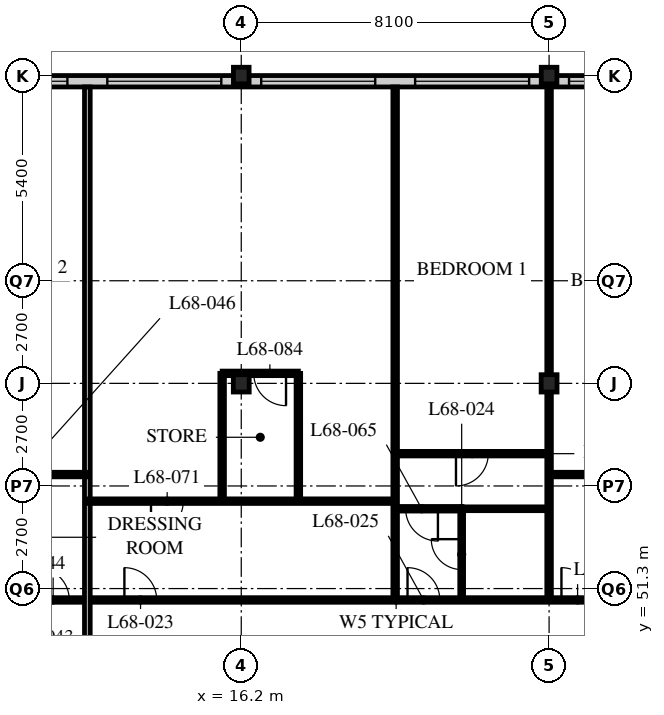
"""IFC4 building model, lengths in metres.
Left out: names, types, materials, properties, quantities, classifications, styles, units other than length and angle.
Written with IfcOpenShell. Run it as: python <this file> out.ifc"""

import sys

from ifc_helpers import new_model, si_unit, direction, frame, frame_2d, origin, origin_2d, place, context, subcontext, project, spatial, rectangle, i_section, extrude, element, fill, save


model = new_model("IFC4")
c1 = context("Model", 3, precision=1e-05, world=origin(), true_north=direction((0.0, 1.0)))
c2 = subcontext(c1, "Body", "Model", "MODEL_VIEW")
j1 = project(units=[si_unit("LENGTHUNIT", "METRE"), si_unit("PLANEANGLEUNIT", "RADIAN")], contexts=[c1])
p1 = place(None, origin())
s1 = spatial("IfcSite", under=j1, at=p1, CompositionType="ELEMENT")
p2 = place(p1, origin())
s2 = spatial("IfcBuilding", under=s1, at=p2, CompositionType="ELEMENT")
p3 = place(p2, frame((0.0, 0.0, 265.8)))
s3 = spatial("IfcBuildingStorey", under=s2, at=p3, CompositionType="ELEMENT", Elevation=265.8)
p4 = place(p3, frame((16.2, 56.7, 0.0), z_axis=(0.0, 0.0, 1.0), x_axis=(1.0, 0.0, 0.0)))
e1 = element("IfcColumn", 1, at=p4, inside=s3, PredefinedType="COLUMN", context=c2, shape_type="SweptSolid", body=[
    extrude(i_section(OverallWidth=0.418, OverallDepth=0.456, WebThickness=0.042, FlangeThickness=0.067, FilletRadius=0.015, at=origin_2d()), origin(), (0.0, 0.0, 1.0), 3.9),
])
p5 = place(p3, frame((16.2, 64.8, 0.0), z_axis=(0.0, 0.0, 1.0), x_axis=(1.0, 0.0, 0.0)))
e2 = element("IfcColumn", 2, at=p5, inside=s3, PredefinedType="COLUMN", context=c2, shape_type="SweptSolid", body=[
    extrude(i_section(OverallWidth=0.412, OverallDepth=0.437, WebThickness=0.036, FlangeThickness=0.058, FilletRadius=0.015, at=origin_2d()), origin(), (0.0, 0.0, 1.0), 3.9),
])
p6 = place(p3, frame((24.3, 56.7, 0.0), z_axis=(0.0, 0.0, 1.0), x_axis=(1.0, 0.0, 0.0)))
e3 = element("IfcColumn", 3, at=p6, inside=s3, PredefinedType="COLUMN", context=c2, shape_type="SweptSolid", body=[
    extrude(i_section(OverallWidth=0.418, OverallDepth=0.456, WebThickness=0.042, FlangeThickness=0.067, FilletRadius=0.015, at=origin_2d()), origin(), (0.0, 0.0, 1.0), 3.9),
])
p7 = place(p3, frame((24.3, 64.8, 0.0), z_axis=(0.0, 0.0, 1.0), x_axis=(1.0, 0.0, 0.0)))
e4 = element("IfcColumn", 4, at=p7, inside=s3, PredefinedType="COLUMN", context=c2, shape_type="SweptSolid", body=[
    extrude(i_section(OverallWidth=0.412, OverallDepth=0.437, WebThickness=0.036, FlangeThickness=0.058, FilletRadius=0.015, at=origin_2d()), origin(), (0.0, 0.0, 1.0), 3.9),
])
p8 = place(p3, frame((48.3, 64.65, 0.0), z_axis=(0.0, 0.0, 1.0), x_axis=(-1.0, 0.0, 0.0)))
e5 = element("IfcWall", 5, at=p8, inside=s3, PredefinedType="SOLIDWALL", context=c2, shape_type="SweptSolid", body=[
    extrude(rectangle(XDim=40.2, YDim=0.3, at=frame_2d((20.1, 0.0))), origin(), (0.0, 0.0, 1.0), 3.69),
])
p9 = place(p8, frame((0.225, 0.0, 0.6)))
e6 = element("IfcOpeningElement", 6, at=p9, cuts=e5, PredefinedType="OPENING", context=c2, shape_type="SweptSolid", body=[
    extrude(rectangle(XDim=3.0, YDim=2.4, at=frame_2d((1.5, 1.2))), frame((0.0, 0.16, 0.0), z_axis=(0.0, -1.0, 0.0), x_axis=(1.0, 0.0, 0.0)), (0.0, 0.0, 1.0), 0.32),
])
p10 = place(p8, frame((4.275, 0.0, 0.6)))
e7 = element("IfcOpeningElement", 7, at=p10, cuts=e5, PredefinedType="OPENING", context=c2, shape_type="SweptSolid", body=[
    extrude(rectangle(XDim=3.0, YDim=2.4, at=frame_2d((1.5, 1.2))), frame((0.0, 0.16, 0.0), z_axis=(0.0, -1.0, 0.0), x_axis=(1.0, 0.0, 0.0)), (0.0, 0.0, 1.0), 0.32),
])
p11 = place(p8, frame((8.325, 0.0, 0.6)))
e8 = element("IfcOpeningElement", 8, at=p11, cuts=e5, PredefinedType="OPENING", context=c2, shape_type="SweptSolid", body=[
    extrude(rectangle(XDim=3.0, YDim=2.4, at=frame_2d((1.5, 1.2))), frame((0.0, 0.16, 0.0), z_axis=(0.0, -1.0, 0.0), x_axis=(1.0, 0.0, 0.0)), (0.0, 0.0, 1.0), 0.32),
])
p12 = place(p8, frame((12.375, 0.0, 0.6)))
e9 = element("IfcOpeningElement", 9, at=p12, cuts=e5, PredefinedType="OPENING", context=c2, shape_type="SweptSolid", body=[
    extrude(rectangle(XDim=3.0, YDim=2.4, at=frame_2d((1.5, 1.2))), frame((0.0, 0.16, 0.0), z_axis=(0.0, -1.0, 0.0), x_axis=(1.0, 0.0, 0.0)), (0.0, 0.0, 1.0), 0.32),
])
p13 = place(p8, frame((16.425, 0.0, 0.6)))
e10 = element("IfcOpeningElement", 10, at=p13, cuts=e5, PredefinedType="OPENING", context=c2, shape_type="SweptSolid", body=[
    extrude(rectangle(XDim=3.0, YDim=2.4, at=frame_2d((1.5, 1.2))), frame((0.0, 0.16, 0.0), z_axis=(0.0, -1.0, 0.0), x_axis=(1.0, 0.0, 0.0)), (0.0, 0.0, 1.0), 0.32),
])
p14 = place(p8, frame((20.475, 0.0, 0.6)))
e11 = element("IfcOpeningElement", 11, at=p14, cuts=e5, PredefinedType="OPENING", context=c2, shape_type="SweptSolid", body=[
    extrude(rectangle(XDim=3.0, YDim=2.4, at=frame_2d((1.5, 1.2))), frame((0.0, 0.16, 0.0), z_axis=(0.0, -1.0, 0.0), x_axis=(1.0, 0.0, 0.0)), (0.0, 0.0, 1.0), 0.32),
])
p15 = place(p8, frame((24.525, 0.0, 0.6)))
e12 = element("IfcOpeningElement", 12, at=p15, cuts=e5, PredefinedType="OPENING", context=c2, shape_type="SweptSolid", body=[
    extrude(rectangle(XDim=3.0, YDim=2.4, at=frame_2d((1.5, 1.2))), frame((0.0, 0.16, 0.0), z_axis=(0.0, -1.0, 0.0), x_axis=(1.0, 0.0, 0.0)), (0.0, 0.0, 1.0), 0.32),
])
p16 = place(p8, frame((28.575, 0.0, 0.6)))
e13 = element("IfcOpeningElement", 13, at=p16, cuts=e5, PredefinedType="OPENING", context=c2, shape_type="SweptSolid", body=[
    extrude(rectangle(XDim=3.0, YDim=2.4, at=frame_2d((1.5, 1.2))), frame((0.0, 0.16, 0.0), z_axis=(0.0, -1.0, 0.0), x_axis=(1.0, 0.0, 0.0)), (0.0, 0.0, 1.0), 0.32),
])
p17 = place(p8, frame((32.625, 0.0, 0.6)))
e14 = element("IfcOpeningElement", 14, at=p17, cuts=e5, PredefinedType="OPENING", context=c2, shape_type="SweptSolid", body=[
    extrude(rectangle(XDim=3.0, YDim=2.4, at=frame_2d((1.5, 1.2))), frame((0.0, 0.16, 0.0), z_axis=(0.0, -1.0, 0.0), x_axis=(1.0, 0.0, 0.0)), (0.0, 0.0, 1.0), 0.32),
])
p18 = place(p8, frame((36.675, 0.0, 0.6)))
e15 = element("IfcOpeningElement", 15, at=p18, cuts=e5, PredefinedType="OPENING", context=c2, shape_type="SweptSolid", body=[
    extrude(rectangle(XDim=3.0, YDim=2.4, at=frame_2d((1.5, 1.2))), frame((0.0, 0.16, 0.0), z_axis=(0.0, -1.0, 0.0), x_axis=(1.0, 0.0, 0.0)), (0.0, 0.0, 1.0), 0.32),
])
p19 = place(p3, frame((22.0, 51.0, 0.0), z_axis=(0.0, 0.0, 1.0), x_axis=(0.0, 1.0, 0.0)))
e16 = element("IfcWall", 16, at=p19, inside=s3, PredefinedType="PARTITIONING", context=c2, shape_type="SweptSolid", body=[
    extrude(rectangle(XDim=2.4, YDim=0.1, at=frame_2d((1.2, 0.0))), origin(), (0.0, 0.0, 1.0), 3.69),
])
p20 = place(p19, frame((0.8, 0.0, 0.0)))
e17 = element("IfcOpeningElement", 17, at=p20, cuts=e16, PredefinedType="OPENING", context=c2, shape_type="SweptSolid", body=[
    extrude(rectangle(XDim=0.8, YDim=2.1, at=frame_2d((0.4, 1.05))), frame((0.0, 0.06, 0.0), z_axis=(0.0, -1.0, 0.0), x_axis=(1.0, 0.0, 0.0)), (0.0, 0.0, 1.0), 0.12),
])
p21 = place(p3, frame((22.0, 53.4, 0.0), z_axis=(0.0, 0.0, 1.0), x_axis=(1.0, 0.0, 0.0)))
e18 = element("IfcWall", 18, at=p21, inside=s3, PredefinedType="PARTITIONING", context=c2, shape_type="SweptSolid", body=[
    extrude(rectangle(XDim=2.3, YDim=0.1, at=frame_2d((1.15, 0.0))), origin(), (0.0, 0.0, 1.0), 3.69),
])
p22 = place(p3, frame((20.25, 51.0, 0.0), z_axis=(0.0, 0.0, 1.0), x_axis=(0.0, 1.0, 0.0)))
e19 = element("IfcWall", 19, at=p22, inside=s3, PredefinedType="PARTITIONING", context=c2, shape_type="SweptSolid", body=[
    extrude(rectangle(XDim=13.5, YDim=0.12, at=frame_2d((6.75, 0.0))), origin(), (0.0, 0.0, 1.0), 3.69),
])
p23 = place(p3, frame((24.3, 51.0, 0.0), z_axis=(0.0, 0.0, 1.0), x_axis=(0.0, 1.0, 0.0)))
e20 = element("IfcWall", 20, at=p23, inside=s3, PredefinedType="PARTITIONING", context=c2, shape_type="SweptSolid", body=[
    extrude(rectangle(XDim=13.5, YDim=0.12, at=frame_2d((6.75, 0.0))), origin(), (0.0, 0.0, 1.0), 3.078),
])
p24 = place(p3, frame((4.1, 51.0, 0.0), z_axis=(0.0, 0.0, 1.0), x_axis=(1.0, 0.0, 0.0)))
e21 = element("IfcWall", 21, at=p24, inside=s3, PredefinedType="PARTITIONING", context=c2, shape_type="SweptSolid", body=[
    extrude(rectangle(XDim=32.35, YDim=0.12, at=frame_2d((16.175, 0.0))), origin(), (0.0, 0.0, 1.0), 3.69),
])
p25 = place(p24, frame((9.025, 0.0, 0.0)))
e22 = element("IfcOpeningElement", 22, at=p25, cuts=e21, PredefinedType="OPENING", context=c2, shape_type="SweptSolid", body=[
    extrude(rectangle(XDim=0.85, YDim=2.1, at=frame_2d((0.425, 1.05))), frame((0.0, 0.07, 0.0), z_axis=(0.0, -1.0, 0.0), x_axis=(1.0, 0.0, 0.0)), (0.0, 0.0, 1.0), 0.14),
])
p26 = place(p24, frame((16.475, 0.0, 0.0)))
e23 = element("IfcOpeningElement", 23, at=p26, cuts=e21, PredefinedType="OPENING", context=c2, shape_type="SweptSolid", body=[
    extrude(rectangle(XDim=0.85, YDim=2.1, at=frame_2d((0.425, 1.05))), frame((0.0, 0.07, 0.0), z_axis=(0.0, -1.0, 0.0), x_axis=(1.0, 0.0, 0.0)), (0.0, 0.0, 1.0), 0.14),
])
p27 = place(p24, frame((20.525, 0.0, 0.0)))
e24 = element("IfcOpeningElement", 24, at=p27, cuts=e21, PredefinedType="OPENING", context=c2, shape_type="SweptSolid", body=[
    extrude(rectangle(XDim=0.85, YDim=2.1, at=frame_2d((0.425, 1.05))), frame((0.0, 0.07, 0.0), z_axis=(0.0, -1.0, 0.0), x_axis=(1.0, 0.0, 0.0)), (0.0, 0.0, 1.0), 0.14),
])
p28 = place(p24, frame((25.225, 0.0, 0.0)))
e25 = element("IfcOpeningElement", 25, at=p28, cuts=e21, PredefinedType="OPENING", context=c2, shape_type="SweptSolid", body=[
    extrude(rectangle(XDim=0.85, YDim=2.1, at=frame_2d((0.425, 1.05))), frame((0.0, 0.07, 0.0), z_axis=(0.0, -1.0, 0.0), x_axis=(1.0, 0.0, 0.0)), (0.0, 0.0, 1.0), 0.14),
])
p29 = place(p24, frame((28.625, 0.0, 0.0)))
e26 = element("IfcOpeningElement", 26, at=p29, cuts=e21, PredefinedType="OPENING", context=c2, shape_type="SweptSolid", body=[
    extrude(rectangle(XDim=0.85, YDim=2.1, at=frame_2d((0.425, 1.05))), frame((0.0, 0.07, 0.0), z_axis=(0.0, -1.0, 0.0), x_axis=(1.0, 0.0, 0.0)), (0.0, 0.0, 1.0), 0.14),
])
p30 = place(p24, frame((6.725, 0.0, 0.0)))
e27 = element("IfcOpeningElement", 27, at=p30, cuts=e21, PredefinedType="OPENING", context=c2, shape_type="SweptSolid", body=[
    extrude(rectangle(XDim=0.85, YDim=2.1, at=frame_2d((0.425, 1.05))), frame((0.0, 0.07, 0.0), z_axis=(0.0, -1.0, 0.0), x_axis=(1.0, 0.0, 0.0)), (0.0, 0.0, 1.0), 0.14),
])
p31 = place(p24, frame((2.875, 0.0, 0.0)))
e28 = element("IfcOpeningElement", 28, at=p31, cuts=e21, PredefinedType="OPENING", context=c2, shape_type="SweptSolid", body=[
    extrude(rectangle(XDim=0.85, YDim=2.1, at=frame_2d((0.425, 1.05))), frame((0.0, 0.07, 0.0), z_axis=(0.0, -1.0, 0.0), x_axis=(1.0, 0.0, 0.0)), (0.0, 0.0, 1.0), 0.14),
])
p32 = place(p3, frame((12.15, 48.6, 0.0), z_axis=(0.0, 0.0, 1.0), x_axis=(0.0, 1.0, 0.0)))
e29 = element("IfcWall", 29, at=p32, inside=s3, PredefinedType="PARTITIONING", context=c2, shape_type="SweptSolid", body=[
    extrude(rectangle(XDim=15.9, YDim=0.15, at=frame_2d((7.95, 0.0))), origin(), (0.0, 0.0, 1.0), 3.69),
])
p33 = place(p3, frame((20.25, 53.4, 0.0), z_axis=(0.0, 0.0, 1.0), x_axis=(1.0, 0.0, 0.0)))
e30 = element("IfcWall", 30, at=p33, inside=s3, PredefinedType="PARTITIONING", context=c2, shape_type="SweptSolid", body=[
    extrude(rectangle(XDim=1.76, YDim=0.12, at=frame_2d((0.88, 0.0))), origin(), (0.0, 0.0, 1.0), 3.69),
])
p34 = place(p33, frame((0.275, 0.0, 0.0)))
e31 = element("IfcOpeningElement", 31, at=p34, cuts=e30, PredefinedType="OPENING", context=c2, shape_type="SweptSolid", body=[
    extrude(rectangle(XDim=0.85, YDim=2.1, at=frame_2d((0.425, 1.05))), frame((0.0, 0.07, 0.0), z_axis=(0.0, -1.0, 0.0), x_axis=(1.0, 0.0, 0.0)), (0.0, 0.0, 1.0), 0.14),
])
p35 = place(p3, frame((12.15, 53.6, 0.0), z_axis=(0.0, 0.0, 1.0), x_axis=(1.0, 0.0, 0.0)))
e32 = element("IfcWall", 32, at=p35, inside=s3, PredefinedType="PARTITIONING", context=c2, shape_type="SweptSolid", body=[
    extrude(rectangle(XDim=8.1, YDim=0.12, at=frame_2d((4.05, 0.0))), origin(), (0.0, 0.0, 1.0), 3.69),
])
p36 = place(p35, frame((1.675, 0.0, 0.0)))
e33 = element("IfcOpeningElement", 33, at=p36, cuts=e32, PredefinedType="OPENING", context=c2, shape_type="SweptSolid", body=[
    extrude(rectangle(XDim=0.85, YDim=2.1, at=frame_2d((0.425, 1.05))), frame((0.0, 0.07, 0.0), z_axis=(0.0, -1.0, 0.0), x_axis=(1.0, 0.0, 0.0)), (0.0, 0.0, 1.0), 0.14),
])
p37 = place(p3, frame((20.25, 54.85, 0.0), z_axis=(0.0, 0.0, 1.0), x_axis=(1.0, 0.0, 0.0)))
e34 = element("IfcWall", 34, at=p37, inside=s3, PredefinedType="PARTITIONING", context=c2, shape_type="SweptSolid", body=[
    extrude(rectangle(XDim=4.05, YDim=0.12, at=frame_2d((2.025, 0.0))), origin(), (0.0, 0.0, 1.0), 3.69),
])
p38 = place(p37, frame((1.6, 0.0, 0.0)))
e35 = element("IfcOpeningElement", 35, at=p38, cuts=e34, PredefinedType="OPENING", context=c2, shape_type="SweptSolid", body=[
    extrude(rectangle(XDim=0.85, YDim=2.1, at=frame_2d((0.425, 1.05))), frame((0.0, 0.07, 0.0), z_axis=(0.0, -1.0, 0.0), x_axis=(1.0, 0.0, 0.0)), (0.0, 0.0, 1.0), 0.14),
])
p39 = place(p3, frame((24.3, 54.3, 0.0), z_axis=(0.0, 0.0, 1.0), x_axis=(1.0, 0.0, 0.0)))
e36 = element("IfcWall", 36, at=p39, inside=s3, PredefinedType="PARTITIONING", context=c2, shape_type="SweptSolid", body=[
    extrude(rectangle(XDim=4.05, YDim=0.12, at=frame_2d((2.025, 0.0))), origin(), (0.0, 0.0, 1.0), 3.69),
])
p40 = place(p39, frame((1.6, 0.0, 0.0)))
e37 = element("IfcOpeningElement", 37, at=p40, cuts=e36, PredefinedType="OPENING", context=c2, shape_type="SweptSolid", body=[
    extrude(rectangle(XDim=0.85, YDim=2.1, at=frame_2d((0.425, 1.05))), frame((0.0, 0.07, 0.0), z_axis=(0.0, -1.0, 0.0), x_axis=(1.0, 0.0, 0.0)), (0.0, 0.0, 1.0), 0.14),
])
p41 = place(p3, frame((8.1, 54.3, 0.0), z_axis=(0.0, 0.0, 1.0), x_axis=(1.0, 0.0, 0.0)))
e38 = element("IfcWall", 38, at=p41, inside=s3, PredefinedType="PARTITIONING", context=c2, shape_type="SweptSolid", body=[
    extrude(rectangle(XDim=4.05, YDim=0.12, at=frame_2d((2.025, 0.0))), origin(), (0.0, 0.0, 1.0), 3.69),
])
p42 = place(p41, frame((1.6, 0.0, 0.0)))
e39 = element("IfcOpeningElement", 39, at=p42, cuts=e38, PredefinedType="OPENING", context=c2, shape_type="SweptSolid", body=[
    extrude(rectangle(XDim=0.85, YDim=2.1, at=frame_2d((0.425, 1.05))), frame((0.0, 0.07, 0.0), z_axis=(0.0, -1.0, 0.0), x_axis=(1.0, 0.0, 0.0)), (0.0, 0.0, 1.0), 0.14),
])
for number, where, z_axis, x_axis in (
    (40, (15.697, 53.6, 0.0), (0.0, 0.0, 1.0), (0.0, 1.0, 0.0)),
    (41, (17.703, 53.6, 0.0), (0.0, 0.0, 1.0), (0.0, 1.0, 0.0)),
):
    element("IfcWall", number, at=place(p3, frame(where, z_axis=z_axis, x_axis=x_axis)), inside=s3, PredefinedType="PARTITIONING", context=c2, shape_type="SweptSolid", body=[
        extrude(rectangle(XDim=3.363, YDim=0.12, at=frame_2d((1.681, 0.0))), origin(), (0.0, 0.0, 1.0), 3.69),
    ])
p43 = place(p3, frame((15.697, 56.963, 0.0), z_axis=(0.0, 0.0, 1.0), x_axis=(1.0, 0.0, 0.0)))
e42 = element("IfcWall", 42, at=p43, inside=s3, PredefinedType="PARTITIONING", context=c2, shape_type="SweptSolid", body=[
    extrude(rectangle(XDim=2.006, YDim=0.12, at=frame_2d((1.003, 0.0))), origin(), (0.0, 0.0, 1.0), 3.69),
])
p44 = place(p43, frame((0.831, 0.0, 0.0)))
e43 = element("IfcOpeningElement", 43, at=p44, cuts=e42, PredefinedType="OPENING", context=c2, shape_type="SweptSolid", body=[
    extrude(rectangle(XDim=0.85, YDim=2.1, at=frame_2d((0.425, 1.05))), frame((0.0, 0.07, 0.0), z_axis=(0.0, -1.0, 0.0), x_axis=(1.0, 0.0, 0.0)), (0.0, 0.0, 1.0), 0.14),
])
p45 = place(p14, origin())
e44 = element("IfcWindow", 44, at=p45, inside=s3, PartitioningType="SINGLE_PANEL", PredefinedType="WINDOW", context=c2, shape_type="SweptSolid", body=[
    extrude(rectangle(XDim=3.0, YDim=2.4, at=frame_2d((1.5, 1.2))), frame((0.0, 0.03, 0.0), z_axis=(0.0, -1.0, 0.0), x_axis=(1.0, 0.0, 0.0)), (0.0, 0.0, 1.0), 0.06),
])
fill(e11, e44)
p46 = place(p15, origin())
e45 = element("IfcWindow", 45, at=p46, inside=s3, PartitioningType="SINGLE_PANEL", PredefinedType="WINDOW", context=c2, shape_type="SweptSolid", body=[
    extrude(rectangle(XDim=3.0, YDim=2.4, at=frame_2d((1.5, 1.2))), frame((0.0, 0.03, 0.0), z_axis=(0.0, -1.0, 0.0), x_axis=(1.0, 0.0, 0.0)), (0.0, 0.0, 1.0), 0.06),
])
fill(e12, e45)
p47 = place(p16, origin())
e46 = element("IfcWindow", 46, at=p47, inside=s3, PartitioningType="SINGLE_PANEL", PredefinedType="WINDOW", context=c2, shape_type="SweptSolid", body=[
    extrude(rectangle(XDim=3.0, YDim=2.4, at=frame_2d((1.5, 1.2))), frame((0.0, 0.03, 0.0), z_axis=(0.0, -1.0, 0.0), x_axis=(1.0, 0.0, 0.0)), (0.0, 0.0, 1.0), 0.06),
])
fill(e13, e46)
p48 = place(p17, origin())
e47 = element("IfcWindow", 47, at=p48, inside=s3, PartitioningType="SINGLE_PANEL", PredefinedType="WINDOW", context=c2, shape_type="SweptSolid", body=[
    extrude(rectangle(XDim=3.0, YDim=2.4, at=frame_2d((1.5, 1.2))), frame((0.0, 0.03, 0.0), z_axis=(0.0, -1.0, 0.0), x_axis=(1.0, 0.0, 0.0)), (0.0, 0.0, 1.0), 0.06),
])
fill(e14, e47)
p49 = place(p18, origin())
e48 = element("IfcWindow", 48, at=p49, inside=s3, PartitioningType="SINGLE_PANEL", PredefinedType="WINDOW", context=c2, shape_type="SweptSolid", body=[
    extrude(rectangle(XDim=3.0, YDim=2.4, at=frame_2d((1.5, 1.2))), frame((0.0, 0.03, 0.0), z_axis=(0.0, -1.0, 0.0), x_axis=(1.0, 0.0, 0.0)), (0.0, 0.0, 1.0), 0.06),
])
fill(e15, e48)
p50 = place(p25, origin())
e49 = element("IfcDoor", 49, at=p50, inside=s3, OperationType="SINGLE_SWING_LEFT", PredefinedType="DOOR", context=c2, shape_type="SweptSolid", body=[
    extrude(rectangle(XDim=0.85, YDim=2.1, at=frame_2d((0.425, 1.05))), frame((0.0, 0.025, 0.0), z_axis=(0.0, -1.0, 0.0), x_axis=(1.0, 0.0, 0.0)), (0.0, 0.0, 1.0), 0.05),
])
fill(e22, e49)
p51 = place(p20, origin())
e50 = element("IfcDoor", 50, at=p51, inside=s3, OperationType="SINGLE_SWING_RIGHT", PredefinedType="DOOR", context=c2, shape_type="SweptSolid", body=[
    extrude(rectangle(XDim=0.8, YDim=2.1, at=frame_2d((0.4, 1.05))), frame((0.0, 0.025, 0.0), z_axis=(0.0, -1.0, 0.0), x_axis=(1.0, 0.0, 0.0)), (0.0, 0.0, 1.0), 0.05),
])
fill(e17, e50)
p52 = place(p26, origin())
e51 = element("IfcDoor", 51, at=p52, inside=s3, OperationType="SINGLE_SWING_LEFT", PredefinedType="DOOR", context=c2, shape_type="SweptSolid", body=[
    extrude(rectangle(XDim=0.85, YDim=2.1, at=frame_2d((0.425, 1.05))), frame((0.0, 0.025, 0.0), z_axis=(0.0, -1.0, 0.0), x_axis=(1.0, 0.0, 0.0)), (0.0, 0.0, 1.0), 0.05),
])
fill(e23, e51)
p53 = place(p27, origin())
e52 = element("IfcDoor", 52, at=p53, inside=s3, OperationType="SINGLE_SWING_LEFT", PredefinedType="DOOR", context=c2, shape_type="SweptSolid", body=[
    extrude(rectangle(XDim=0.85, YDim=2.1, at=frame_2d((0.425, 1.05))), frame((0.0, 0.025, 0.0), z_axis=(0.0, -1.0, 0.0), x_axis=(1.0, 0.0, 0.0)), (0.0, 0.0, 1.0), 0.05),
])
fill(e24, e52)
p54 = place(p30, origin())
e53 = element("IfcDoor", 53, at=p54, inside=s3, OperationType="SINGLE_SWING_LEFT", PredefinedType="DOOR", context=c2, shape_type="SweptSolid", body=[
    extrude(rectangle(XDim=0.85, YDim=2.1, at=frame_2d((0.425, 1.05))), frame((0.0, 0.025, 0.0), z_axis=(0.0, -1.0, 0.0), x_axis=(1.0, 0.0, 0.0)), (0.0, 0.0, 1.0), 0.05),
])
fill(e27, e53)
p55 = place(p34, origin())
e54 = element("IfcDoor", 54, at=p55, inside=s3, OperationType="SINGLE_SWING_LEFT", PredefinedType="DOOR", context=c2, shape_type="SweptSolid", body=[
    extrude(rectangle(XDim=0.85, YDim=2.1, at=frame_2d((0.425, 1.05))), frame((0.0, 0.025, 0.0), z_axis=(0.0, -1.0, 0.0), x_axis=(1.0, 0.0, 0.0)), (0.0, 0.0, 1.0), 0.05),
])
fill(e31, e54)
p56 = place(p36, origin())
e55 = element("IfcDoor", 55, at=p56, inside=s3, OperationType="SINGLE_SWING_RIGHT", PredefinedType="DOOR", context=c2, shape_type="SweptSolid", body=[
    extrude(rectangle(XDim=0.85, YDim=2.1, at=frame_2d((0.425, 1.05))), frame((0.0, 0.025, 0.0), z_axis=(0.0, -1.0, 0.0), x_axis=(1.0, 0.0, 0.0)), (0.0, 0.0, 1.0), 0.05),
])
fill(e33, e55)
p57 = place(p38, origin())
e56 = element("IfcDoor", 56, at=p57, inside=s3, OperationType="SINGLE_SWING_RIGHT", PredefinedType="DOOR", context=c2, shape_type="SweptSolid", body=[
    extrude(rectangle(XDim=0.85, YDim=2.1, at=frame_2d((0.425, 1.05))), frame((0.0, 0.025, 0.0), z_axis=(0.0, -1.0, 0.0), x_axis=(1.0, 0.0, 0.0)), (0.0, 0.0, 1.0), 0.05),
])
fill(e35, e56)
p58 = place(p44, origin())
e57 = element("IfcDoor", 57, at=p58, inside=s3, OperationType="SINGLE_SWING_LEFT", PredefinedType="DOOR", context=c2, shape_type="SweptSolid", body=[
    extrude(rectangle(XDim=0.85, YDim=2.1, at=frame_2d((0.425, 1.05))), frame((0.0, 0.025, 0.0), z_axis=(0.0, -1.0, 0.0), x_axis=(1.0, 0.0, 0.0)), (0.0, 0.0, 1.0), 0.05),
])
fill(e43, e57)
save(model, sys.argv[1])
